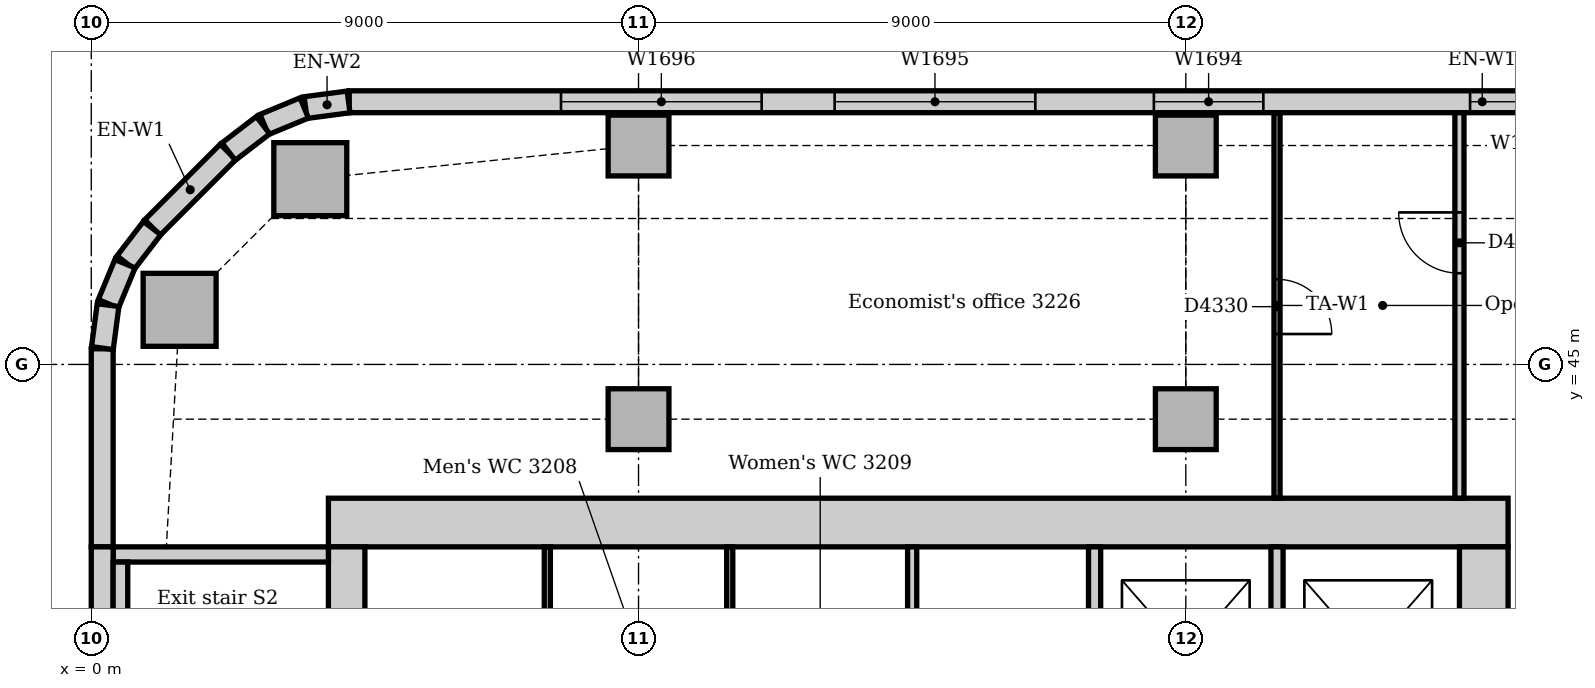
"""IFC4 building model, lengths in metres.
Left out: names, types, materials, properties, quantities, classifications, styles, units other than length and angle.
Written with IfcOpenShell. Run it as: python <this file> out.ifc"""

import sys

from ifc_helpers import new_model, si_unit, direction, frame, frame_2d, origin, origin_2d, place, context, subcontext, project, spatial, rectangle, extrude, element, fill, save


model = new_model("IFC4")
c1 = context("Model", 3, precision=1e-05, world=origin(), true_north=direction((0.0, 1.0)))
c2 = subcontext(c1, "Body", "Model", "MODEL_VIEW")
j1 = project(units=[si_unit("LENGTHUNIT", "METRE"), si_unit("PLANEANGLEUNIT", "RADIAN")], contexts=[c1])
p1 = place(None, origin())
s1 = spatial("IfcSite", under=j1, at=p1, CompositionType="ELEMENT")
p2 = place(p1, origin())
s2 = spatial("IfcBuilding", under=s1, at=p2, CompositionType="ELEMENT")
p3 = place(p2, frame((0.0, 0.0, 136.0)))
s3 = spatial("IfcBuildingStorey", under=s2, at=p3, CompositionType="ELEMENT", Elevation=136.0)
p4 = place(p3, frame((23.3, 42.4, 0.0), z_axis=(0.0, 0.0, 1.0), x_axis=(-1.0, 0.0, 0.0)))
e1 = element("IfcWall", 1, at=p4, inside=s3, PredefinedType="SOLIDWALL", context=c2, shape_type="SweptSolid", body=[
    extrude(rectangle(XDim=19.4, YDim=0.8, at=frame_2d((9.7, 0.0))), origin(), (0.0, 0.0, 1.0), 4.0),
])
p5 = place(p3, frame((22.9, 31.5, 0.0), z_axis=(0.0, 0.0, 1.0), x_axis=(0.0, 1.0, 0.0)))
e2 = element("IfcWall", 2, at=p5, inside=s3, PredefinedType="SOLIDWALL", context=c2, shape_type="SweptSolid", body=[
    extrude(rectangle(XDim=10.5, YDim=0.8, at=frame_2d((5.25, 0.0))), origin(), (0.0, 0.0, 1.0), 4.0),
])
p6 = place(p5, frame((3.15, 0.0, 0.0)))
e3 = element("IfcOpeningElement", 3, at=p6, cuts=e2, PredefinedType="OPENING", context=c2, shape_type="SweptSolid", body=[
    extrude(rectangle(XDim=1.0, YDim=2.1, at=frame_2d((0.5, 1.05))), frame((0.0, 0.41, 0.0), z_axis=(0.0, -1.0, 0.0), x_axis=(1.0, 0.0, 0.0)), (0.0, 0.0, 1.0), 0.82),
])
p7 = place(p5, frame((5.2, 0.0, 0.0)))
e4 = element("IfcOpeningElement", 4, at=p7, cuts=e2, PredefinedType="OPENING", context=c2, shape_type="SweptSolid", body=[
    extrude(rectangle(XDim=1.0, YDim=2.1, at=frame_2d((0.5, 1.05))), frame((0.0, 0.41, 0.0), z_axis=(0.0, -1.0, 0.0), x_axis=(1.0, 0.0, 0.0)), (0.0, 0.0, 1.0), 0.82),
])
p8 = place(p3, frame((4.2, 42.0, 0.0), z_axis=(0.0, 0.0, 1.0), x_axis=(0.0, -1.0, 0.0)))
e5 = element("IfcWall", 5, at=p8, inside=s3, PredefinedType="SOLIDWALL", context=c2, shape_type="SweptSolid", body=[
    extrude(rectangle(XDim=10.5, YDim=0.6, at=frame_2d((5.25, 0.0))), origin(), (0.0, 0.0, 1.0), 4.0),
])
p9 = place(p8, frame((5.3, 0.0, 0.0)))
e6 = element("IfcOpeningElement", 6, at=p9, cuts=e5, PredefinedType="OPENING", context=c2, shape_type="SweptSolid", body=[
    extrude(rectangle(XDim=1.0, YDim=2.1, at=frame_2d((0.5, 1.05))), frame((0.0, 0.31, 0.0), z_axis=(0.0, -1.0, 0.0), x_axis=(1.0, 0.0, 0.0)), (0.0, 0.0, 1.0), 0.62),
])
p10 = place(p3, frame((3.9, 41.875, 0.0), z_axis=(0.0, 0.0, 1.0), x_axis=(-1.0, 0.0, 0.0)))
e7 = element("IfcWall", 7, at=p10, inside=s3, PredefinedType="SOLIDWALL", context=c2, shape_type="SweptSolid", body=[
    extrude(rectangle(XDim=3.54, YDim=0.25, at=frame_2d((1.77, 0.0))), origin(), (0.0, 0.0, 1.0), 4.0),
])
for number, where, z_axis, x_axis in (
    (8, (3.602, 48.047, 0.0), (0.0, 0.0, 1.0), (1.0, 0.0, 0.0)),
    (9, (1.453, 45.898, 0.0), (0.0, 0.0, 1.0), (1.0, 0.0, 0.0)),
):
    element("IfcColumn", number, at=place(p3, frame(where, z_axis=z_axis, x_axis=x_axis)), inside=s3, PredefinedType="COLUMN", context=c2, shape_type="SweptSolid", body=[
        extrude(rectangle(XDim=1.2, YDim=1.2, at=origin_2d()), origin(), (0.0, 0.0, 1.0), 3.85),
    ])
for number, where, z_axis, x_axis in (
    (10, (9.0, 48.6, 0.0), (0.0, 0.0, 1.0), (1.0, 0.0, 0.0)),
    (11, (18.0, 48.6, 0.0), (0.0, 0.0, 1.0), (1.0, 0.0, 0.0)),
    (12, (9.0, 44.1, 0.0), (0.0, 0.0, 1.0), (1.0, 0.0, 0.0)),
    (13, (18.0, 44.1, 0.0), (0.0, 0.0, 1.0), (1.0, 0.0, 0.0)),
):
    element("IfcColumn", number, at=place(p3, frame(where, z_axis=z_axis, x_axis=x_axis)), inside=s3, PredefinedType="COLUMN", context=c2, shape_type="SweptSolid", body=[
        extrude(rectangle(XDim=1.0, YDim=1.0, at=origin_2d()), origin(), (0.0, 0.0, 1.0), 3.85),
    ])
p11 = place(p3, frame((41.507, 49.32, 0.0), z_axis=(0.0, 0.0, 1.0), x_axis=(-1.0, 0.0, 0.0)))
e14 = element("IfcWall", 14, at=p11, inside=s3, PredefinedType="STANDARD", context=c2, shape_type="SweptSolid", body=[
    extrude(rectangle(XDim=37.265, YDim=0.36, at=frame_2d((18.632, 0.0))), origin(), (0.0, 0.0, 1.0), 3.85),
])
p12 = place(p11, frame((3.482, 0.0, 0.9)))
e15 = element("IfcOpeningElement", 15, at=p12, cuts=e14, PredefinedType="OPENING", context=c2, shape_type="SweptSolid", body=[
    extrude(rectangle(XDim=3.3, YDim=1.6, at=frame_2d((1.65, 0.8))), frame((0.0, 0.19, 0.0), z_axis=(0.0, -1.0, 0.0), x_axis=(1.0, 0.0, 0.0)), (0.0, 0.0, 1.0), 0.38),
])
p13 = place(p11, frame((7.982, 0.0, 0.9)))
e16 = element("IfcOpeningElement", 16, at=p13, cuts=e14, PredefinedType="OPENING", context=c2, shape_type="SweptSolid", body=[
    extrude(rectangle(XDim=3.3, YDim=1.6, at=frame_2d((1.65, 0.8))), frame((0.0, 0.19, 0.0), z_axis=(0.0, -1.0, 0.0), x_axis=(1.0, 0.0, 0.0)), (0.0, 0.0, 1.0), 0.38),
])
p14 = place(p11, frame((12.482, 0.0, 0.9)))
e17 = element("IfcOpeningElement", 17, at=p14, cuts=e14, PredefinedType="OPENING", context=c2, shape_type="SweptSolid", body=[
    extrude(rectangle(XDim=3.3, YDim=1.6, at=frame_2d((1.65, 0.8))), frame((0.0, 0.19, 0.0), z_axis=(0.0, -1.0, 0.0), x_axis=(1.0, 0.0, 0.0)), (0.0, 0.0, 1.0), 0.38),
])
p15 = place(p11, frame((17.032, 0.0, 0.9)))
e18 = element("IfcOpeningElement", 18, at=p15, cuts=e14, PredefinedType="OPENING", context=c2, shape_type="SweptSolid", body=[
    extrude(rectangle(XDim=1.8, YDim=1.6, at=frame_2d((0.9, 0.8))), frame((0.0, 0.19, 0.0), z_axis=(0.0, -1.0, 0.0), x_axis=(1.0, 0.0, 0.0)), (0.0, 0.0, 1.0), 0.38),
])
p16 = place(p11, frame((22.232, 0.0, 0.9)))
e19 = element("IfcOpeningElement", 19, at=p16, cuts=e14, PredefinedType="OPENING", context=c2, shape_type="SweptSolid", body=[
    extrude(rectangle(XDim=1.8, YDim=1.6, at=frame_2d((0.9, 0.8))), frame((0.0, 0.19, 0.0), z_axis=(0.0, -1.0, 0.0), x_axis=(1.0, 0.0, 0.0)), (0.0, 0.0, 1.0), 0.38),
])
p17 = place(p11, frame((25.982, 0.0, 0.9)))
e20 = element("IfcOpeningElement", 20, at=p17, cuts=e14, PredefinedType="OPENING", context=c2, shape_type="SweptSolid", body=[
    extrude(rectangle(XDim=3.3, YDim=1.6, at=frame_2d((1.65, 0.8))), frame((0.0, 0.19, 0.0), z_axis=(0.0, -1.0, 0.0), x_axis=(1.0, 0.0, 0.0)), (0.0, 0.0, 1.0), 0.38),
])
p18 = place(p11, frame((30.482, 0.0, 0.9)))
e21 = element("IfcOpeningElement", 21, at=p18, cuts=e14, PredefinedType="OPENING", context=c2, shape_type="SweptSolid", body=[
    extrude(rectangle(XDim=3.3, YDim=1.6, at=frame_2d((1.65, 0.8))), frame((0.0, 0.19, 0.0), z_axis=(0.0, -1.0, 0.0), x_axis=(1.0, 0.0, 0.0)), (0.0, 0.0, 1.0), 0.38),
])
p19 = place(p3, frame((2.249, 48.494, 0.0), z_axis=(0.0, 0.0, 1.0), x_axis=(-0.707106781187, -0.707106781187, 0.0)))
e22 = element("IfcWall", 22, at=p19, inside=s3, PredefinedType="STANDARD", context=c2, shape_type="SweptSolid", body=[
    extrude(rectangle(XDim=1.757, YDim=0.36, at=frame_2d((0.879, 0.0))), origin(), (0.0, 0.0, 1.0), 3.85),
])
p20 = place(p3, frame((0.18, 45.257, 0.0), z_axis=(0.0, 0.0, 1.0), x_axis=(0.0, -1.0, 0.0)))
e23 = element("IfcWall", 23, at=p20, inside=s3, PredefinedType="STANDARD", context=c2, shape_type="SweptSolid", body=[
    extrude(rectangle(XDim=3.257, YDim=0.36, at=frame_2d((1.629, 0.0))), origin(), (0.0, 0.0, 1.0), 3.85),
])
p21 = place(p3, frame((0.18, 42.0, 0.0), z_axis=(0.0, 0.0, 1.0), x_axis=(0.0, -1.0, 0.0)))
e24 = element("IfcWall", 24, at=p21, inside=s3, PredefinedType="STANDARD", context=c2, shape_type="SweptSolid", body=[
    extrude(rectangle(XDim=6.0, YDim=0.36, at=frame_2d((3.0, 0.0))), origin(), (0.0, 0.0, 1.0), 3.85),
])
for number, where, z_axis, x_axis in (
    (25, (4.231, 49.317, 0.0), (0.0, 0.0, 1.0), (-0.991, -0.131, 0.0)),
    (26, (3.503, 49.218, 0.0), (0.0, 0.0, 1.0), (-0.924, -0.383, 0.0)),
):
    element("IfcWall", number, at=place(p3, frame(where, z_axis=z_axis, x_axis=x_axis)), inside=s3, PredefinedType="STANDARD", context=c2, shape_type="SweptSolid", body=[
        extrude(rectangle(XDim=0.713, YDim=0.36, at=frame_2d((0.356, 0.0))), origin(), (0.0, 0.0, 1.0), 3.85),
    ])
for number, where, z_axis, x_axis in (
    (27, (2.825, 48.934, 0.0), (0.0, 0.0, 1.0), (-0.793, -0.609, 0.0)),
    (28, (1.0, 47.241, 0.0), (0.0, 0.0, 1.0), (-0.609, -0.793, 0.0)),
):
    element("IfcWall", number, at=place(p3, frame(where, z_axis=z_axis, x_axis=x_axis)), inside=s3, PredefinedType="STANDARD", context=c2, shape_type="SweptSolid", body=[
        extrude(rectangle(XDim=0.713, YDim=0.36, at=frame_2d((0.357, 0.0))), origin(), (0.0, 0.0, 1.0), 3.85),
    ])
for number, where, z_axis, x_axis in (
    (29, (0.555, 46.656, 0.0), (0.0, 0.0, 1.0), (-0.383, -0.924, 0.0)),
    (30, (0.276, 45.976, 0.0), (0.0, 0.0, 1.0), (-0.131, -0.991, 0.0)),
):
    element("IfcWall", number, at=place(p3, frame(where, z_axis=z_axis, x_axis=x_axis)), inside=s3, PredefinedType="STANDARD", context=c2, shape_type="SweptSolid", body=[
        extrude(rectangle(XDim=0.713, YDim=0.36, at=frame_2d((0.356, 0.0))), origin(), (0.0, 0.0, 1.0), 3.85),
    ])
p22 = place(p3, frame((0.48, 40.13, 0.0), z_axis=(0.0, 0.0, 1.0), x_axis=(0.0, 1.0, 0.0)))
e31 = element("IfcWall", 31, at=p22, inside=s3, PredefinedType="STANDARD", context=c2, shape_type="SweptSolid", body=[
    extrude(rectangle(XDim=1.62, YDim=0.24, at=frame_2d((0.81, 0.0))), origin(), (0.0, 0.0, 1.0), 4.0),
])
for number, where, z_axis, x_axis in (
    (32, (16.5, 38.6, 0.0), (0.0, 0.0, 1.0), (0.0, 1.0, 0.0)),
    (33, (19.5, 38.6, 0.0), (0.0, 0.0, 1.0), (0.0, 1.0, 0.0)),
):
    element("IfcWall", number, at=place(p3, frame(where, z_axis=z_axis, x_axis=x_axis)), inside=s3, PredefinedType="PARTITIONING", context=c2, shape_type="SweptSolid", body=[
        extrude(rectangle(XDim=3.4, YDim=0.2, at=frame_2d((1.7, 0.0))), origin(), (0.0, 0.0, 1.0), 3.85),
    ])
p23 = place(p3, frame((22.5, 42.8, 0.0), z_axis=(0.0, 0.0, 1.0), x_axis=(0.0, 1.0, 0.0)))
e34 = element("IfcWall", 34, at=p23, inside=s3, PredefinedType="PARTITIONING", context=c2, shape_type="SweptSolid", body=[
    extrude(rectangle(XDim=6.34, YDim=0.15, at=frame_2d((3.17, 0.0))), origin(), (0.0, 0.0, 1.0), 3.85),
])
p24 = place(p23, frame((3.7, 0.0, 0.0)))
e35 = element("IfcOpeningElement", 35, at=p24, cuts=e34, PredefinedType="OPENING", context=c2, shape_type="SweptSolid", body=[
    extrude(rectangle(XDim=1.0, YDim=2.1, at=frame_2d((0.5, 1.05))), frame((0.0, 0.085, 0.0), z_axis=(0.0, -1.0, 0.0), x_axis=(1.0, 0.0, 0.0)), (0.0, 0.0, 1.0), 0.17),
])
p25 = place(p3, frame((13.5, 38.575, 0.0), z_axis=(0.0, 0.0, 1.0), x_axis=(0.0, 1.0, 0.0)))
e36 = element("IfcWall", 36, at=p25, inside=s3, PredefinedType="PARTITIONING", context=c2, shape_type="SweptSolid", body=[
    extrude(rectangle(XDim=3.425, YDim=0.15, at=frame_2d((1.712, 0.0))), origin(), (0.0, 0.0, 1.0), 3.85),
])
p26 = place(p3, frame((19.5, 42.8, 0.0), z_axis=(0.0, 0.0, 1.0), x_axis=(0.0, 1.0, 0.0)))
e37 = element("IfcWall", 37, at=p26, inside=s3, PredefinedType="PARTITIONING", context=c2, shape_type="SweptSolid", body=[
    extrude(rectangle(XDim=6.34, YDim=0.1, at=frame_2d((3.17, 0.0))), origin(), (0.0, 0.0, 1.0), 3.85),
])
p27 = place(p26, frame((2.7, 0.0, 0.0)))
e38 = element("IfcOpeningElement", 38, at=p27, cuts=e37, PredefinedType="OPENING", context=c2, shape_type="SweptSolid", body=[
    extrude(rectangle(XDim=0.9, YDim=2.1, at=frame_2d((0.45, 1.05))), frame((0.0, 0.06, 0.0), z_axis=(0.0, -1.0, 0.0), x_axis=(1.0, 0.0, 0.0)), (0.0, 0.0, 1.0), 0.12),
])
for number, where, z_axis, x_axis in (
    (39, (7.5, 38.575, 0.0), (0.0, 0.0, 1.0), (0.0, 1.0, 0.0)),
    (40, (10.5, 38.575, 0.0), (0.0, 0.0, 1.0), (0.0, 1.0, 0.0)),
):
    element("IfcWall", number, at=place(p3, frame(where, z_axis=z_axis, x_axis=x_axis)), inside=s3, PredefinedType="PARTITIONING", context=c2, shape_type="SweptSolid", body=[
        extrude(rectangle(XDim=3.425, YDim=0.1, at=frame_2d((1.712, 0.0))), origin(), (0.0, 0.0, 1.0), 3.85),
    ])
p28 = place(p15, origin())
e41 = element("IfcWindow", 41, at=p28, inside=s3, PartitioningType="SINGLE_PANEL", PredefinedType="WINDOW", context=c2, shape_type="SweptSolid", body=[
    extrude(rectangle(XDim=1.8, YDim=1.6, at=frame_2d((0.9, 0.8))), frame((0.0, 0.13, 0.0), z_axis=(0.0, -1.0, 0.0), x_axis=(1.0, 0.0, 0.0)), (0.0, 0.0, 1.0), 0.06),
])
fill(e18, e41)
p29 = place(p16, origin())
e42 = element("IfcWindow", 42, at=p29, inside=s3, PartitioningType="SINGLE_PANEL", PredefinedType="WINDOW", context=c2, shape_type="SweptSolid", body=[
    extrude(rectangle(XDim=1.8, YDim=1.6, at=frame_2d((0.9, 0.8))), frame((0.0, 0.13, 0.0), z_axis=(0.0, -1.0, 0.0), x_axis=(1.0, 0.0, 0.0)), (0.0, 0.0, 1.0), 0.06),
])
fill(e19, e42)
p30 = place(p17, origin())
e43 = element("IfcWindow", 43, at=p30, inside=s3, PartitioningType="SINGLE_PANEL", PredefinedType="WINDOW", context=c2, shape_type="SweptSolid", body=[
    extrude(rectangle(XDim=3.3, YDim=1.6, at=frame_2d((1.65, 0.8))), frame((0.0, 0.13, 0.0), z_axis=(0.0, -1.0, 0.0), x_axis=(1.0, 0.0, 0.0)), (0.0, 0.0, 1.0), 0.06),
])
fill(e20, e43)
p31 = place(p18, origin())
e44 = element("IfcWindow", 44, at=p31, inside=s3, PartitioningType="SINGLE_PANEL", PredefinedType="WINDOW", context=c2, shape_type="SweptSolid", body=[
    extrude(rectangle(XDim=3.3, YDim=1.6, at=frame_2d((1.65, 0.8))), frame((0.0, 0.13, 0.0), z_axis=(0.0, -1.0, 0.0), x_axis=(1.0, 0.0, 0.0)), (0.0, 0.0, 1.0), 0.06),
])
fill(e21, e44)
p32 = place(p24, origin())
e45 = element("IfcDoor", 45, at=p32, inside=s3, OperationType="SINGLE_SWING_RIGHT", PredefinedType="DOOR", context=c2, shape_type="SweptSolid", body=[
    extrude(rectangle(XDim=1.0, YDim=2.1, at=frame_2d((0.5, 1.05))), frame((0.0, 0.025, 0.0), z_axis=(0.0, -1.0, 0.0), x_axis=(1.0, 0.0, 0.0)), (0.0, 0.0, 1.0), 0.05),
])
fill(e35, e45)
p33 = place(p27, frame((0.9, 0.0, 0.0), z_axis=(0.0, 0.0, 1.0), x_axis=(-1.0, 0.0, 0.0)))
e46 = element("IfcDoor", 46, at=p33, inside=s3, OperationType="SINGLE_SWING_RIGHT", PredefinedType="DOOR", context=c2, shape_type="SweptSolid", body=[
    extrude(rectangle(XDim=0.9, YDim=2.1, at=frame_2d((0.45, 1.05))), frame((0.0, 0.025, 0.0), z_axis=(0.0, -1.0, 0.0), x_axis=(1.0, 0.0, 0.0)), (0.0, 0.0, 1.0), 0.05),
])
fill(e38, e46)
save(model, sys.argv[1])
